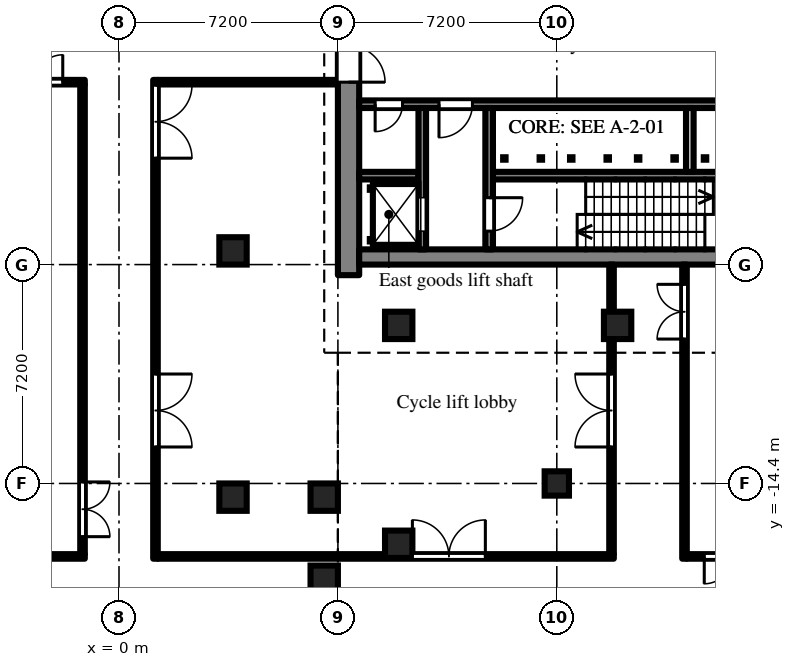
"""IFC4 building model, lengths in metres.
Left out: names, types, materials, properties, quantities, classifications, styles, units other than length and angle.
Written with IfcOpenShell. Run it as: python <this file> out.ifc"""

import sys

from ifc_helpers import new_model, si_unit, direction, frame, frame_2d, origin, origin_2d, place, context, subcontext, project, spatial, rectangle, extrude, element, fill, save


model = new_model("IFC4")
c1 = context("Model", 3, precision=1e-05, world=origin(), true_north=direction((0.0, 1.0)))
c2 = subcontext(c1, "Body", "Model", "MODEL_VIEW")
j1 = project(units=[si_unit("LENGTHUNIT", "METRE"), si_unit("PLANEANGLEUNIT", "RADIAN")], contexts=[c1])
p1 = place(None, origin())
s1 = spatial("IfcSite", under=j1, at=p1, CompositionType="ELEMENT")
p2 = place(p1, origin())
s2 = spatial("IfcBuilding", under=s1, at=p2, CompositionType="ELEMENT")
p3 = place(p2, frame((0.0, 0.0, -4.8)))
s3 = spatial("IfcBuildingStorey", under=s2, at=p3, CompositionType="ELEMENT", Elevation=-4.8)
for number, where, z_axis, x_axis in (
    (1, (3.75, -14.85, -0.5), (0.0, 0.0, 1.0), (1.0, 0.0, 0.0)),
    (2, (3.75, -6.75, -0.5), (0.0, 0.0, 1.0), (1.0, 0.0, 0.0)),
    (3, (6.75, -17.55, -0.5), (0.0, 0.0, 1.0), (1.0, 0.0, 0.0)),
    (4, (6.75, -14.85, -0.5), (0.0, 0.0, 1.0), (1.0, 0.0, 0.0)),
):
    element("IfcColumn", number, at=place(p3, frame(where, z_axis=z_axis, x_axis=x_axis)), inside=s3, PredefinedType="COLUMN", context=c2, shape_type="SweptSolid", body=[
        extrude(rectangle(XDim=0.9, YDim=0.9, at=origin_2d()), origin(), (0.0, 0.0, 1.0), 5.3),
    ])
p4 = place(p3, frame((14.4, -14.4, -0.5), z_axis=(0.0, 0.0, 1.0), x_axis=(1.0, 0.0, 0.0)))
e5 = element("IfcColumn", 5, at=p4, inside=s3, PredefinedType="COLUMN", context=c2, shape_type="SweptSolid", body=[
    extrude(rectangle(XDim=0.8, YDim=0.8, at=origin_2d()), origin(), (0.0, 0.0, 1.0), 5.3),
])
for number, where, z_axis, x_axis in (
    (6, (9.2, -16.4, -0.5), (0.0, 0.0, 1.0), (1.0, 0.0, 0.0)),
    (7, (9.2, -9.2, -0.5), (0.0, 0.0, 1.0), (1.0, 0.0, 0.0)),
    (8, (16.4, -9.2, -0.5), (0.0, 0.0, 1.0), (1.0, 0.0, 0.0)),
):
    element("IfcColumn", number, at=place(p3, frame(where, z_axis=z_axis, x_axis=x_axis)), inside=s3, PredefinedType="COLUMN", context=c2, shape_type="SweptSolid", body=[
        extrude(rectangle(XDim=0.9, YDim=0.9, at=origin_2d()), origin(), (0.0, 0.0, 1.0), 5.3),
    ])
p5 = place(p3, frame((7.55, -7.548, 0.0), z_axis=(0.0, 0.0, 1.0), x_axis=(0.0, 1.0, 0.0)))
e9 = element("IfcWall", 9, at=p5, inside=s3, PredefinedType="SHEAR", context=c2, shape_type="SweptSolid", body=[
    extrude(rectangle(XDim=15.096, YDim=0.7, at=frame_2d((7.548, 0.0))), origin(), (0.0, 0.0, 1.0), 4.35),
])
p6 = place(p5, frame((6.348, 0.0, 0.0)))
e10 = element("IfcOpeningElement", 10, at=p6, cuts=e9, PredefinedType="OPENING", context=c2, shape_type="SweptSolid", body=[
    extrude(rectangle(XDim=2.4, YDim=2.2, at=frame_2d((1.2, 1.1))), frame((0.0, 0.36, 0.0), z_axis=(0.0, -1.0, 0.0), x_axis=(1.0, 0.0, 0.0)), (0.0, 0.0, 1.0), 0.72),
])
p7 = place(p3, frame((7.9, -6.95, 0.0), z_axis=(0.0, 0.0, 1.0), x_axis=(1.0, 0.0, 0.0)))
e11 = element("IfcWall", 11, at=p7, inside=s3, PredefinedType="SHEAR", context=c2, shape_type="SweptSolid", body=[
    extrude(rectangle(XDim=12.95, YDim=0.5, at=frame_2d((6.475, 0.0))), origin(), (0.0, 0.0, 1.0), 4.35),
])
p8 = place(p3, frame((7.9, -1.925, 0.0), z_axis=(0.0, 0.0, 1.0), x_axis=(1.0, 0.0, 0.0)))
e12 = element("IfcWall", 12, at=p8, inside=s3, PredefinedType="SHEAR", context=c2, shape_type="SweptSolid", body=[
    extrude(rectangle(XDim=12.95, YDim=0.25, at=frame_2d((6.475, 0.0))), origin(), (0.0, 0.0, 1.0), 4.35),
])
p9 = place(p8, frame((0.525, 0.0, 0.0)))
e13 = element("IfcOpeningElement", 13, at=p9, cuts=e12, PredefinedType="OPENING", context=c2, shape_type="SweptSolid", body=[
    extrude(rectangle(XDim=0.9, YDim=2.1, at=frame_2d((0.45, 1.05))), frame((0.0, 0.135, 0.0), z_axis=(0.0, -1.0, 0.0), x_axis=(1.0, 0.0, 0.0)), (0.0, 0.0, 1.0), 0.27),
])
p10 = place(p8, frame((2.625, 0.0, 0.0)))
e14 = element("IfcOpeningElement", 14, at=p10, cuts=e12, PredefinedType="OPENING", context=c2, shape_type="SweptSolid", body=[
    extrude(rectangle(XDim=1.1, YDim=2.1, at=frame_2d((0.55, 1.05))), frame((0.0, 0.135, 0.0), z_axis=(0.0, -1.0, 0.0), x_axis=(1.0, 0.0, 0.0)), (0.0, 0.0, 1.0), 0.27),
])
p11 = place(p3, frame((7.9, -4.275, 0.0), z_axis=(0.0, 0.0, 1.0), x_axis=(1.0, 0.0, 0.0)))
e15 = element("IfcWall", 15, at=p11, inside=s3, PredefinedType="SHEAR", context=c2, shape_type="SweptSolid", body=[
    extrude(rectangle(XDim=1.95, YDim=0.25, at=frame_2d((0.975, 0.0))), origin(), (0.0, 0.0, 1.0), 4.35),
])
p12 = place(p3, frame((12.3, -4.275, 0.0), z_axis=(0.0, 0.0, 1.0), x_axis=(1.0, 0.0, 0.0)))
e16 = element("IfcWall", 16, at=p12, inside=s3, PredefinedType="SHEAR", context=c2, shape_type="SweptSolid", body=[
    extrude(rectangle(XDim=8.55, YDim=0.25, at=frame_2d((4.275, 0.0))), origin(), (0.0, 0.0, 1.0), 4.35),
])
p13 = place(p3, frame((9.975, -2.05, 0.0), z_axis=(0.0, 0.0, 1.0), x_axis=(0.0, -1.0, 0.0)))
e17 = element("IfcWall", 17, at=p13, inside=s3, PredefinedType="SHEAR", context=c2, shape_type="SweptSolid", body=[
    extrude(rectangle(XDim=4.65, YDim=0.25, at=frame_2d((2.325, 0.0))), origin(), (0.0, 0.0, 1.0), 4.35),
])
p14 = place(p13, frame((2.95, 0.0, 0.0)))
e18 = element("IfcOpeningElement", 18, at=p14, cuts=e17, PredefinedType="OPENING", context=c2, shape_type="SweptSolid", body=[
    extrude(rectangle(XDim=1.1, YDim=2.1, at=frame_2d((0.55, 1.05))), frame((0.0, 0.135, 0.0), z_axis=(0.0, -1.0, 0.0), x_axis=(1.0, 0.0, 0.0)), (0.0, 0.0, 1.0), 0.27),
])
p15 = place(p3, frame((12.175, -2.05, 0.0), z_axis=(0.0, 0.0, 1.0), x_axis=(0.0, -1.0, 0.0)))
e19 = element("IfcWall", 19, at=p15, inside=s3, PredefinedType="SHEAR", context=c2, shape_type="SweptSolid", body=[
    extrude(rectangle(XDim=4.65, YDim=0.25, at=frame_2d((2.325, 0.0))), origin(), (0.0, 0.0, 1.0), 4.35),
])
p16 = place(p15, frame((2.95, 0.0, 0.0)))
e20 = element("IfcOpeningElement", 20, at=p16, cuts=e19, PredefinedType="OPENING", context=c2, shape_type="SweptSolid", body=[
    extrude(rectangle(XDim=1.1, YDim=2.1, at=frame_2d((0.55, 1.05))), frame((0.0, 0.135, 0.0), z_axis=(0.0, -1.0, 0.0), x_axis=(1.0, 0.0, 0.0)), (0.0, 0.0, 1.0), 0.27),
])
p17 = place(p3, frame((18.775, -2.05, 0.0), z_axis=(0.0, 0.0, 1.0), x_axis=(0.0, -1.0, 0.0)))
e21 = element("IfcWall", 21, at=p17, inside=s3, PredefinedType="PARTITIONING", context=c2, shape_type="SweptSolid", body=[
    extrude(rectangle(XDim=2.1, YDim=0.25, at=frame_2d((1.05, 0.0))), origin(), (0.0, 0.0, 1.0), 4.35),
])
p18 = place(p3, frame((-16.125, -16.8, 0.0), z_axis=(0.0, 0.0, 1.0), x_axis=(1.0, 0.0, 0.0)))
e22 = element("IfcWall", 22, at=p18, inside=s3, PredefinedType="PARTITIONING", context=c2, shape_type="SweptSolid", body=[
    extrude(rectangle(XDim=15.0, YDim=0.15, at=frame_2d((7.5, 0.0))), origin(), (0.0, 0.0, 1.0), 4.35),
])
p19 = place(p18, frame((0.575, 0.0, 0.0)))
e23 = element("IfcOpeningElement", 23, at=p19, cuts=e22, PredefinedType="OPENING", context=c2, shape_type="SweptSolid", body=[
    extrude(rectangle(XDim=1.8, YDim=2.1, at=frame_2d((0.9, 1.05))), frame((0.0, 0.085, 0.0), z_axis=(0.0, -1.0, 0.0), x_axis=(1.0, 0.0, 0.0)), (0.0, 0.0, 1.0), 0.17),
])
p20 = place(p3, frame((-7.2, -1.2, 0.0), z_axis=(0.0, 0.0, 1.0), x_axis=(1.0, 0.0, 0.0)))
e24 = element("IfcWall", 24, at=p20, inside=s3, PredefinedType="PARTITIONING", context=c2, shape_type="SweptSolid", body=[
    extrude(rectangle(XDim=6.075, YDim=0.15, at=frame_2d((3.038, 0.0))), origin(), (0.0, 0.0, 1.0), 4.35),
])
p21 = place(p20, frame((3.55, 0.0, 0.0)))
e25 = element("IfcOpeningElement", 25, at=p21, cuts=e24, PredefinedType="OPENING", context=c2, shape_type="SweptSolid", body=[
    extrude(rectangle(XDim=1.8, YDim=2.1, at=frame_2d((0.9, 1.05))), frame((0.0, 0.085, 0.0), z_axis=(0.0, -1.0, 0.0), x_axis=(1.0, 0.0, 0.0)), (0.0, 0.0, 1.0), 0.17),
])
p22 = place(p3, frame((-1.2, -16.725, 0.0), z_axis=(0.0, 0.0, 1.0), x_axis=(0.0, 1.0, 0.0)))
e26 = element("IfcWall", 26, at=p22, inside=s3, PredefinedType="PARTITIONING", context=c2, shape_type="SweptSolid", body=[
    extrude(rectangle(XDim=15.45, YDim=0.15, at=frame_2d((7.725, 0.0))), origin(), (0.0, 0.0, 1.0), 4.35),
])
p23 = place(p22, frame((0.575, 0.0, 0.0)))
e27 = element("IfcOpeningElement", 27, at=p23, cuts=e26, PredefinedType="OPENING", context=c2, shape_type="SweptSolid", body=[
    extrude(rectangle(XDim=1.8, YDim=2.1, at=frame_2d((0.9, 1.05))), frame((0.0, 0.085, 0.0), z_axis=(0.0, -1.0, 0.0), x_axis=(1.0, 0.0, 0.0)), (0.0, 0.0, 1.0), 0.17),
])
p24 = place(p3, frame((1.2, -16.875, 0.0), z_axis=(0.0, 0.0, 1.0), x_axis=(0.0, 1.0, 0.0)))
e28 = element("IfcWall", 28, at=p24, inside=s3, PredefinedType="PARTITIONING", context=c2, shape_type="SweptSolid", body=[
    extrude(rectangle(XDim=15.75, YDim=0.15, at=frame_2d((7.875, 0.0))), origin(), (0.0, 0.0, 1.0), 4.35),
])
p25 = place(p24, frame((13.175, 0.0, 0.0)))
e29 = element("IfcOpeningElement", 29, at=p25, cuts=e28, PredefinedType="OPENING", context=c2, shape_type="SweptSolid", body=[
    extrude(rectangle(XDim=2.4, YDim=2.1, at=frame_2d((1.2, 1.05))), frame((0.0, 0.085, 0.0), z_axis=(0.0, -1.0, 0.0), x_axis=(1.0, 0.0, 0.0)), (0.0, 0.0, 1.0), 0.17),
])
p26 = place(p24, frame((3.675, 0.0, 0.0)))
e30 = element("IfcOpeningElement", 30, at=p26, cuts=e28, PredefinedType="OPENING", context=c2, shape_type="SweptSolid", body=[
    extrude(rectangle(XDim=2.4, YDim=2.1, at=frame_2d((1.2, 1.05))), frame((0.0, 0.085, 0.0), z_axis=(0.0, -1.0, 0.0), x_axis=(1.0, 0.0, 0.0)), (0.0, 0.0, 1.0), 0.17),
])
p27 = place(p3, frame((1.275, -16.8, 0.0), z_axis=(0.0, 0.0, 1.0), x_axis=(1.0, 0.0, 0.0)))
e31 = element("IfcWall", 31, at=p27, inside=s3, PredefinedType="PARTITIONING", context=c2, shape_type="SweptSolid", body=[
    extrude(rectangle(XDim=15.0, YDim=0.15, at=frame_2d((7.5, 0.0))), origin(), (0.0, 0.0, 1.0), 4.35),
])
p28 = place(p27, frame((8.375, 0.0, 0.0)))
e32 = element("IfcOpeningElement", 32, at=p28, cuts=e31, PredefinedType="OPENING", context=c2, shape_type="SweptSolid", body=[
    extrude(rectangle(XDim=2.4, YDim=2.1, at=frame_2d((1.2, 1.05))), frame((0.0, 0.085, 0.0), z_axis=(0.0, -1.0, 0.0), x_axis=(1.0, 0.0, 0.0)), (0.0, 0.0, 1.0), 0.17),
])
p29 = place(p3, frame((1.275, -1.2, 0.0), z_axis=(0.0, 0.0, 1.0), x_axis=(1.0, 0.0, 0.0)))
e33 = element("IfcWall", 33, at=p29, inside=s3, PredefinedType="PARTITIONING", context=c2, shape_type="SweptSolid", body=[
    extrude(rectangle(XDim=5.925, YDim=0.15, at=frame_2d((2.962, 0.0))), origin(), (0.0, 0.0, 1.0), 4.35),
])
p30 = place(p3, frame((16.2, -16.725, 0.0), z_axis=(0.0, 0.0, 1.0), x_axis=(0.0, 1.0, 0.0)))
e34 = element("IfcWall", 34, at=p30, inside=s3, PredefinedType="PARTITIONING", context=c2, shape_type="SweptSolid", body=[
    extrude(rectangle(XDim=9.525, YDim=0.15, at=frame_2d((4.763, 0.0))), origin(), (0.0, 0.0, 1.0), 4.35),
])
p31 = place(p30, frame((3.525, 0.0, 0.0)))
e35 = element("IfcOpeningElement", 35, at=p31, cuts=e34, PredefinedType="OPENING", context=c2, shape_type="SweptSolid", body=[
    extrude(rectangle(XDim=2.4, YDim=2.1, at=frame_2d((1.2, 1.05))), frame((0.0, 0.085, 0.0), z_axis=(0.0, -1.0, 0.0), x_axis=(1.0, 0.0, 0.0)), (0.0, 0.0, 1.0), 0.17),
])
p32 = place(p3, frame((18.6, -16.875, 0.0), z_axis=(0.0, 0.0, 1.0), x_axis=(0.0, 1.0, 0.0)))
e36 = element("IfcWall", 36, at=p32, inside=s3, PredefinedType="PARTITIONING", context=c2, shape_type="SweptSolid", body=[
    extrude(rectangle(XDim=9.675, YDim=0.15, at=frame_2d((4.837, 0.0))), origin(), (0.0, 0.0, 1.0), 4.35),
])
p33 = place(p32, frame((7.225, 0.0, 0.0)))
e37 = element("IfcOpeningElement", 37, at=p33, cuts=e36, PredefinedType="OPENING", context=c2, shape_type="SweptSolid", body=[
    extrude(rectangle(XDim=1.8, YDim=2.1, at=frame_2d((0.9, 1.05))), frame((0.0, 0.085, 0.0), z_axis=(0.0, -1.0, 0.0), x_axis=(1.0, 0.0, 0.0)), (0.0, 0.0, 1.0), 0.17),
])
p34 = place(p3, frame((18.675, -16.8, 0.0), z_axis=(0.0, 0.0, 1.0), x_axis=(1.0, 0.0, 0.0)))
e38 = element("IfcWall", 38, at=p34, inside=s3, PredefinedType="PARTITIONING", context=c2, shape_type="SweptSolid", body=[
    extrude(rectangle(XDim=12.6, YDim=0.15, at=frame_2d((6.3, 0.0))), origin(), (0.0, 0.0, 1.0), 4.35),
])
p35 = place(p34, frame((0.575, 0.0, 0.0)))
e39 = element("IfcOpeningElement", 39, at=p35, cuts=e38, PredefinedType="OPENING", context=c2, shape_type="SweptSolid", body=[
    extrude(rectangle(XDim=1.8, YDim=2.1, at=frame_2d((0.9, 1.05))), frame((0.0, 0.085, 0.0), z_axis=(0.0, -1.0, 0.0), x_axis=(1.0, 0.0, 0.0)), (0.0, 0.0, 1.0), 0.17),
])
p36 = place(p14, origin())
e40 = element("IfcDoor", 40, at=p36, inside=s3, OperationType="SLIDING_TO_LEFT", PredefinedType="DOOR", context=c2, shape_type="SweptSolid", body=[
    extrude(rectangle(XDim=1.1, YDim=2.1, at=frame_2d((0.55, 1.05))), frame((0.0, 0.025, 0.0), z_axis=(0.0, -1.0, 0.0), x_axis=(1.0, 0.0, 0.0)), (0.0, 0.0, 1.0), 0.05),
])
fill(e18, e40)
p37 = place(p16, origin())
e41 = element("IfcDoor", 41, at=p37, inside=s3, OperationType="SINGLE_SWING_LEFT", PredefinedType="DOOR", context=c2, shape_type="SweptSolid", body=[
    extrude(rectangle(XDim=1.1, YDim=2.1, at=frame_2d((0.55, 1.05))), frame((0.0, 0.025, 0.0), z_axis=(0.0, -1.0, 0.0), x_axis=(1.0, 0.0, 0.0)), (0.0, 0.0, 1.0), 0.05),
])
fill(e20, e41)
p38 = place(p9, frame((0.9, 0.0, 0.0), z_axis=(0.0, 0.0, 1.0), x_axis=(-1.0, 0.0, 0.0)))
e42 = element("IfcDoor", 42, at=p38, inside=s3, OperationType="SINGLE_SWING_RIGHT", PredefinedType="DOOR", context=c2, shape_type="SweptSolid", body=[
    extrude(rectangle(XDim=0.9, YDim=2.1, at=frame_2d((0.45, 1.05))), frame((0.0, 0.025, 0.0), z_axis=(0.0, -1.0, 0.0), x_axis=(1.0, 0.0, 0.0)), (0.0, 0.0, 1.0), 0.05),
])
fill(e13, e42)
p39 = place(p10, frame((1.1, 0.0, 0.0), z_axis=(0.0, 0.0, 1.0), x_axis=(-1.0, 0.0, 0.0)))
e43 = element("IfcDoor", 43, at=p39, inside=s3, OperationType="SINGLE_SWING_RIGHT", PredefinedType="DOOR", context=c2, shape_type="SweptSolid", body=[
    extrude(rectangle(XDim=1.1, YDim=2.1, at=frame_2d((0.55, 1.05))), frame((0.0, 0.025, 0.0), z_axis=(0.0, -1.0, 0.0), x_axis=(1.0, 0.0, 0.0)), (0.0, 0.0, 1.0), 0.05),
])
fill(e14, e43)
p40 = place(p6, frame((2.4, 0.0, 0.0), z_axis=(0.0, 0.0, 1.0), x_axis=(-1.0, 0.0, 0.0)))
e44 = element("IfcDoor", 44, at=p40, inside=s3, OperationType="DOUBLE_DOOR_DOUBLE_SWING", PredefinedType="DOOR", context=c2, shape_type="SweptSolid", body=[
    extrude(rectangle(XDim=2.4, YDim=2.2, at=frame_2d((1.2, 1.1))), frame((0.0, 0.025, 0.0), z_axis=(0.0, -1.0, 0.0), x_axis=(1.0, 0.0, 0.0)), (0.0, 0.0, 1.0), 0.05),
])
fill(e10, e44)
p41 = place(p25, frame((2.4, 0.0, 0.0), z_axis=(0.0, 0.0, 1.0), x_axis=(-1.0, 0.0, 0.0)))
e45 = element("IfcDoor", 45, at=p41, inside=s3, OperationType="DOUBLE_DOOR_DOUBLE_SWING", PredefinedType="DOOR", context=c2, shape_type="SweptSolid", body=[
    extrude(rectangle(XDim=2.4, YDim=2.1, at=frame_2d((1.2, 1.05))), frame((0.0, 0.025, 0.0), z_axis=(0.0, -1.0, 0.0), x_axis=(1.0, 0.0, 0.0)), (0.0, 0.0, 1.0), 0.05),
])
fill(e29, e45)
p42 = place(p26, frame((2.4, 0.0, 0.0), z_axis=(0.0, 0.0, 1.0), x_axis=(-1.0, 0.0, 0.0)))
e46 = element("IfcDoor", 46, at=p42, inside=s3, OperationType="DOUBLE_DOOR_DOUBLE_SWING", PredefinedType="DOOR", context=c2, shape_type="SweptSolid", body=[
    extrude(rectangle(XDim=2.4, YDim=2.1, at=frame_2d((1.2, 1.05))), frame((0.0, 0.025, 0.0), z_axis=(0.0, -1.0, 0.0), x_axis=(1.0, 0.0, 0.0)), (0.0, 0.0, 1.0), 0.05),
])
fill(e30, e46)
p43 = place(p28, origin())
e47 = element("IfcDoor", 47, at=p43, inside=s3, OperationType="DOUBLE_DOOR_DOUBLE_SWING", PredefinedType="DOOR", context=c2, shape_type="SweptSolid", body=[
    extrude(rectangle(XDim=2.4, YDim=2.1, at=frame_2d((1.2, 1.05))), frame((0.0, 0.025, 0.0), z_axis=(0.0, -1.0, 0.0), x_axis=(1.0, 0.0, 0.0)), (0.0, 0.0, 1.0), 0.05),
])
fill(e32, e47)
p44 = place(p31, origin())
e48 = element("IfcDoor", 48, at=p44, inside=s3, OperationType="DOUBLE_DOOR_DOUBLE_SWING", PredefinedType="DOOR", context=c2, shape_type="SweptSolid", body=[
    extrude(rectangle(XDim=2.4, YDim=2.1, at=frame_2d((1.2, 1.05))), frame((0.0, 0.025, 0.0), z_axis=(0.0, -1.0, 0.0), x_axis=(1.0, 0.0, 0.0)), (0.0, 0.0, 1.0), 0.05),
])
fill(e35, e48)
p45 = place(p21, origin())
e49 = element("IfcDoor", 49, at=p45, inside=s3, OperationType="DOUBLE_DOOR_DOUBLE_SWING", PredefinedType="DOOR", context=c2, shape_type="SweptSolid", body=[
    extrude(rectangle(XDim=1.8, YDim=2.1, at=frame_2d((0.9, 1.05))), frame((0.0, 0.025, 0.0), z_axis=(0.0, -1.0, 0.0), x_axis=(1.0, 0.0, 0.0)), (0.0, 0.0, 1.0), 0.05),
])
fill(e25, e49)
p46 = place(p23, frame((1.8, 0.0, 0.0), z_axis=(0.0, 0.0, 1.0), x_axis=(-1.0, 0.0, 0.0)))
e50 = element("IfcDoor", 50, at=p46, inside=s3, OperationType="DOUBLE_DOOR_DOUBLE_SWING", PredefinedType="DOOR", context=c2, shape_type="SweptSolid", body=[
    extrude(rectangle(XDim=1.8, YDim=2.1, at=frame_2d((0.9, 1.05))), frame((0.0, 0.025, 0.0), z_axis=(0.0, -1.0, 0.0), x_axis=(1.0, 0.0, 0.0)), (0.0, 0.0, 1.0), 0.05),
])
fill(e27, e50)
p47 = place(p33, origin())
e51 = element("IfcDoor", 51, at=p47, inside=s3, OperationType="DOUBLE_DOOR_DOUBLE_SWING", PredefinedType="DOOR", context=c2, shape_type="SweptSolid", body=[
    extrude(rectangle(XDim=1.8, YDim=2.1, at=frame_2d((0.9, 1.05))), frame((0.0, 0.025, 0.0), z_axis=(0.0, -1.0, 0.0), x_axis=(1.0, 0.0, 0.0)), (0.0, 0.0, 1.0), 0.05),
])
fill(e37, e51)
p48 = place(p35, frame((1.8, 0.0, 0.0), z_axis=(0.0, 0.0, 1.0), x_axis=(-1.0, 0.0, 0.0)))
e52 = element("IfcDoor", 52, at=p48, inside=s3, OperationType="DOUBLE_DOOR_DOUBLE_SWING", PredefinedType="DOOR", context=c2, shape_type="SweptSolid", body=[
    extrude(rectangle(XDim=1.8, YDim=2.1, at=frame_2d((0.9, 1.05))), frame((0.0, 0.025, 0.0), z_axis=(0.0, -1.0, 0.0), x_axis=(1.0, 0.0, 0.0)), (0.0, 0.0, 1.0), 0.05),
])
fill(e39, e52)
save(model, sys.argv[1])
